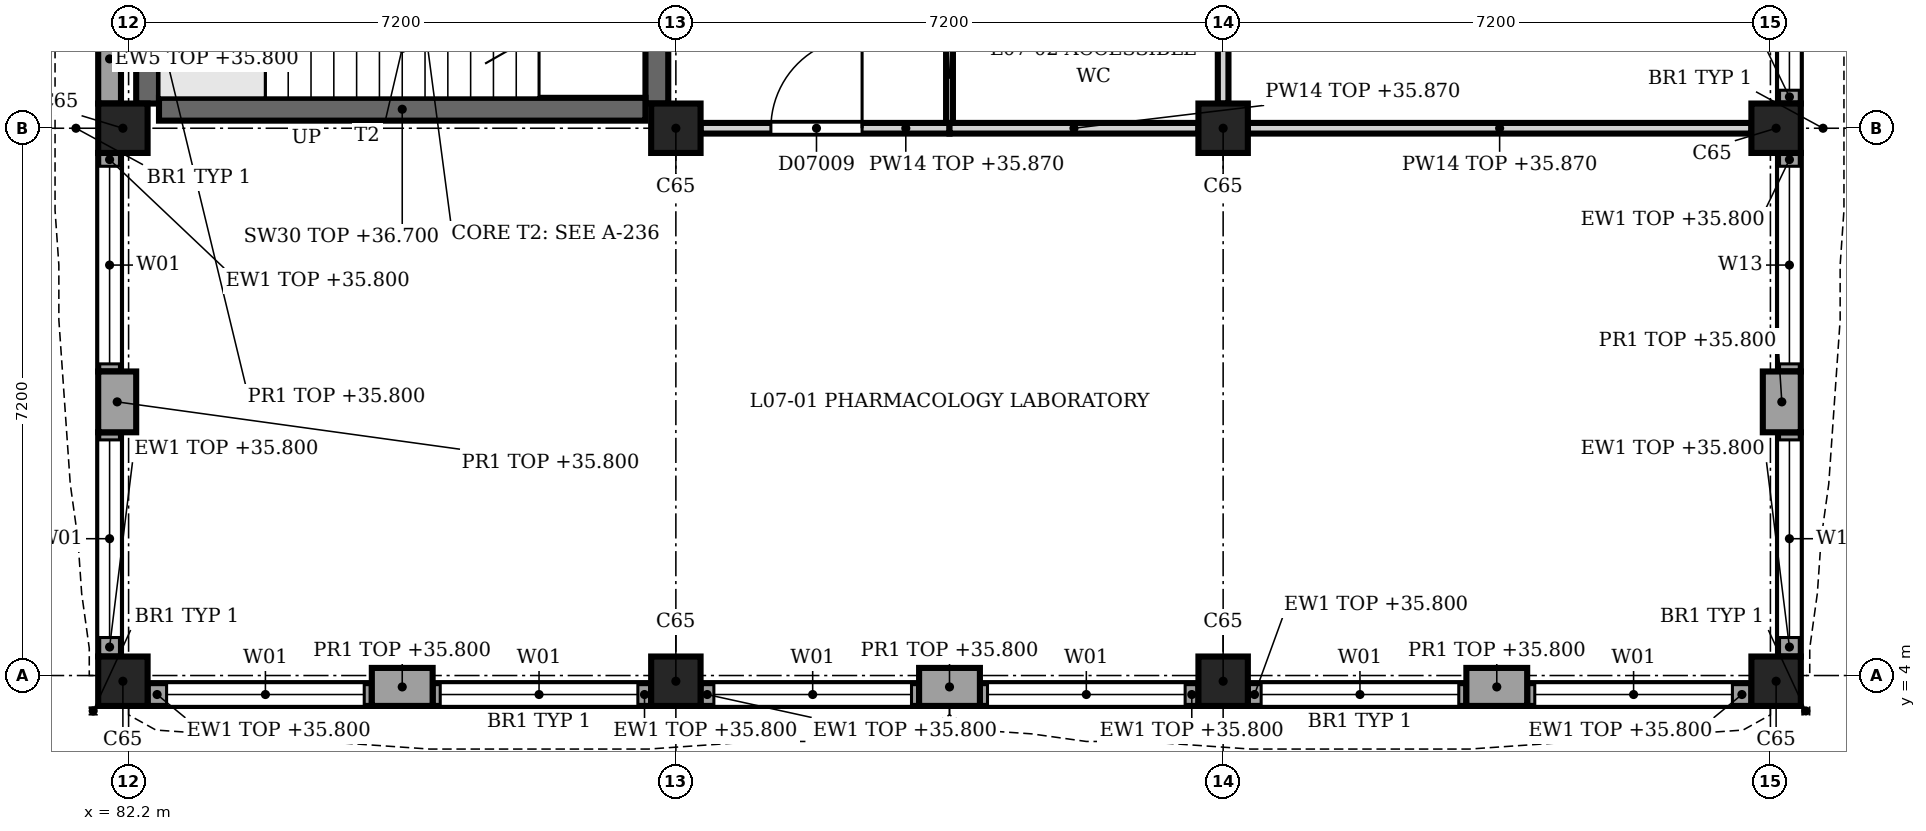
"""IFC4 building model, lengths in metres.
Left out: names, types, materials, properties, quantities, classifications, styles, units other than length and angle.
Written with IfcOpenShell. Run it as: python <this file> out.ifc"""

import sys

from ifc_helpers import new_model, si_unit, direction, frame, frame_2d, origin, origin_2d, place, context, subcontext, project, spatial, rectangle, extrude, element, fill, save


model = new_model("IFC4")
c1 = context("Model", 3, precision=1e-05, world=origin(), true_north=direction((0.0, 1.0)))
c2 = subcontext(c1, "Body", "Model", "MODEL_VIEW")
j1 = project(units=[si_unit("LENGTHUNIT", "METRE"), si_unit("PLANEANGLEUNIT", "RADIAN")], contexts=[c1])
p1 = place(None, origin())
s1 = spatial("IfcSite", under=j1, at=p1, CompositionType="ELEMENT")
p2 = place(p1, origin())
s2 = spatial("IfcBuilding", under=s1, at=p2, CompositionType="ELEMENT")
p3 = place(p2, frame((0.0, 0.0, 32.4)))
s3 = spatial("IfcBuildingStorey", under=s2, at=p3, CompositionType="ELEMENT", Elevation=32.4)
for number, where, z_axis, x_axis in (
    (1, (82.125, 3.925, 0.0), (0.0, 0.0, 1.0), (1.0, 0.0, 0.0)),
    (2, (82.125, 11.2, 0.0), (0.0, 0.0, 1.0), (1.0, 0.0, 0.0)),
    (3, (89.4, 3.925, 0.0), (0.0, 0.0, 1.0), (1.0, 0.0, 0.0)),
    (4, (89.4, 11.2, 0.0), (0.0, 0.0, 1.0), (1.0, 0.0, 0.0)),
    (5, (96.6, 3.925, 0.0), (0.0, 0.0, 1.0), (1.0, 0.0, 0.0)),
    (6, (96.6, 11.2, 0.0), (0.0, 0.0, 1.0), (1.0, 0.0, 0.0)),
    (7, (103.875, 3.925, 0.0), (0.0, 0.0, 1.0), (1.0, 0.0, 0.0)),
    (8, (103.875, 11.2, 0.0), (0.0, 0.0, 1.0), (1.0, 0.0, 0.0)),
):
    element("IfcColumn", number, at=place(p3, frame(where, z_axis=z_axis, x_axis=x_axis)), inside=s3, PredefinedType="COLUMN", context=c2, shape_type="SweptSolid", body=[
        extrude(rectangle(XDim=0.65, YDim=0.65, at=origin_2d()), origin(), (0.0, 0.0, 1.0), 4.5),
    ])
p4 = place(p3, frame((82.05, 7.2, 0.0), z_axis=(0.0, 0.0, 1.0), x_axis=(0.0, 1.0, 0.0)))
e9 = element("IfcWall", 9, at=p4, inside=s3, PredefinedType="SOLIDWALL", context=c2, shape_type="SweptSolid", body=[
    extrude(rectangle(XDim=0.8, YDim=0.5, at=frame_2d((0.4, 0.0))), origin(), (0.0, 0.0, 1.0), 3.4),
])
p5 = place(p3, frame((81.95, 4.25, 0.0), z_axis=(0.0, 0.0, 1.0), x_axis=(0.0, 1.0, 0.0)))
e10 = element("IfcWall", 10, at=p5, inside=s3, PredefinedType="SOLIDWALL", context=c2, shape_type="SweptSolid", body=[
    extrude(rectangle(XDim=2.95, YDim=0.3, at=frame_2d((1.475, 0.0))), origin(), (0.0, 0.0, 1.0), 3.4),
])
p6 = place(p5, frame((0.25, 0.0, 0.9)))
e11 = element("IfcOpeningElement", 11, at=p6, cuts=e10, PredefinedType="OPENING", context=c2, shape_type="SweptSolid", body=[
    extrude(rectangle(XDim=2.6, YDim=2.4, at=frame_2d((1.3, 1.2))), frame((0.0, 0.16, 0.0), z_axis=(0.0, -1.0, 0.0), x_axis=(1.0, 0.0, 0.0)), (0.0, 0.0, 1.0), 0.32),
])
p7 = place(p3, frame((81.95, 8.0, 0.0), z_axis=(0.0, 0.0, 1.0), x_axis=(0.0, 1.0, 0.0)))
e12 = element("IfcWall", 12, at=p7, inside=s3, PredefinedType="SOLIDWALL", context=c2, shape_type="SweptSolid", body=[
    extrude(rectangle(XDim=2.875, YDim=0.3, at=frame_2d((1.438, 0.0))), origin(), (0.0, 0.0, 1.0), 3.4),
])
p8 = place(p7, frame((0.1, 0.0, 0.9)))
e13 = element("IfcOpeningElement", 13, at=p8, cuts=e12, PredefinedType="OPENING", context=c2, shape_type="SweptSolid", body=[
    extrude(rectangle(XDim=2.6, YDim=2.4, at=frame_2d((1.3, 1.2))), frame((0.0, 0.16, 0.0), z_axis=(0.0, -1.0, 0.0), x_axis=(1.0, 0.0, 0.0)), (0.0, 0.0, 1.0), 0.32),
])
p9 = place(p3, frame((81.95, 11.525, 0.0), z_axis=(0.0, 0.0, 1.0), x_axis=(0.0, 1.0, 0.0)))
e14 = element("IfcWall", 14, at=p9, inside=s3, PredefinedType="SOLIDWALL", context=c2, shape_type="SweptSolid", body=[
    extrude(rectangle(XDim=2.875, YDim=0.3, at=frame_2d((1.438, 0.0))), origin(), (0.0, 0.0, 1.0), 3.4),
])
p10 = place(p9, frame((1.175, 0.0, 1.2)))
e15 = element("IfcOpeningElement", 15, at=p10, cuts=e14, PredefinedType="OPENING", context=c2, shape_type="SweptSolid", body=[
    extrude(rectangle(XDim=0.6, YDim=1.8, at=frame_2d((0.3, 0.9))), frame((0.0, 0.16, 0.0), z_axis=(0.0, -1.0, 0.0), x_axis=(1.0, 0.0, 0.0)), (0.0, 0.0, 1.0), 0.32),
])
p11 = place(p3, frame((103.95, 8.0, 0.0), z_axis=(0.0, 0.0, 1.0), x_axis=(0.0, -1.0, 0.0)))
e16 = element("IfcWall", 16, at=p11, inside=s3, PredefinedType="SOLIDWALL", context=c2, shape_type="SweptSolid", body=[
    extrude(rectangle(XDim=0.8, YDim=0.5, at=frame_2d((0.4, 0.0))), origin(), (0.0, 0.0, 1.0), 3.4),
])
p12 = place(p3, frame((104.05, 14.4, 0.0), z_axis=(0.0, 0.0, 1.0), x_axis=(0.0, -1.0, 0.0)))
e17 = element("IfcWall", 17, at=p12, inside=s3, PredefinedType="SOLIDWALL", context=c2, shape_type="SweptSolid", body=[
    extrude(rectangle(XDim=2.875, YDim=0.3, at=frame_2d((1.438, 0.0))), origin(), (0.0, 0.0, 1.0), 3.4),
])
p13 = place(p12, frame((0.1, 0.0, 0.9)))
e18 = element("IfcOpeningElement", 18, at=p13, cuts=e17, PredefinedType="OPENING", context=c2, shape_type="SweptSolid", body=[
    extrude(rectangle(XDim=2.6, YDim=2.2, at=frame_2d((1.3, 1.1))), frame((0.0, 0.16, 0.0), z_axis=(0.0, -1.0, 0.0), x_axis=(1.0, 0.0, 0.0)), (0.0, 0.0, 1.0), 0.32),
])
p14 = place(p3, frame((104.05, 10.875, 0.0), z_axis=(0.0, 0.0, 1.0), x_axis=(0.0, -1.0, 0.0)))
e19 = element("IfcWall", 19, at=p14, inside=s3, PredefinedType="SOLIDWALL", context=c2, shape_type="SweptSolid", body=[
    extrude(rectangle(XDim=2.875, YDim=0.3, at=frame_2d((1.438, 0.0))), origin(), (0.0, 0.0, 1.0), 3.4),
])
p15 = place(p14, frame((0.175, 0.0, 0.9)))
e20 = element("IfcOpeningElement", 20, at=p15, cuts=e19, PredefinedType="OPENING", context=c2, shape_type="SweptSolid", body=[
    extrude(rectangle(XDim=2.6, YDim=2.2, at=frame_2d((1.3, 1.1))), frame((0.0, 0.16, 0.0), z_axis=(0.0, -1.0, 0.0), x_axis=(1.0, 0.0, 0.0)), (0.0, 0.0, 1.0), 0.32),
])
p16 = place(p3, frame((104.05, 7.2, 0.0), z_axis=(0.0, 0.0, 1.0), x_axis=(0.0, -1.0, 0.0)))
e21 = element("IfcWall", 21, at=p16, inside=s3, PredefinedType="SOLIDWALL", context=c2, shape_type="SweptSolid", body=[
    extrude(rectangle(XDim=2.95, YDim=0.3, at=frame_2d((1.475, 0.0))), origin(), (0.0, 0.0, 1.0), 3.4),
])
p17 = place(p16, frame((0.1, 0.0, 0.9)))
e22 = element("IfcOpeningElement", 22, at=p17, cuts=e21, PredefinedType="OPENING", context=c2, shape_type="SweptSolid", body=[
    extrude(rectangle(XDim=2.6, YDim=2.2, at=frame_2d((1.3, 1.1))), frame((0.0, 0.16, 0.0), z_axis=(0.0, -1.0, 0.0), x_axis=(1.0, 0.0, 0.0)), (0.0, 0.0, 1.0), 0.32),
])
p18 = place(p3, frame((100.6, 3.85, 0.0), z_axis=(0.0, 0.0, 1.0), x_axis=(-1.0, 0.0, 0.0)))
e23 = element("IfcWall", 23, at=p18, inside=s3, PredefinedType="SOLIDWALL", context=c2, shape_type="SweptSolid", body=[
    extrude(rectangle(XDim=0.8, YDim=0.5, at=frame_2d((0.4, 0.0))), origin(), (0.0, 0.0, 1.0), 3.4),
])
p19 = place(p3, frame((93.4, 3.85, 0.0), z_axis=(0.0, 0.0, 1.0), x_axis=(-1.0, 0.0, 0.0)))
e24 = element("IfcWall", 24, at=p19, inside=s3, PredefinedType="SOLIDWALL", context=c2, shape_type="SweptSolid", body=[
    extrude(rectangle(XDim=0.8, YDim=0.5, at=frame_2d((0.4, 0.0))), origin(), (0.0, 0.0, 1.0), 3.4),
])
p20 = place(p3, frame((86.2, 3.85, 0.0), z_axis=(0.0, 0.0, 1.0), x_axis=(-1.0, 0.0, 0.0)))
e25 = element("IfcWall", 25, at=p20, inside=s3, PredefinedType="SOLIDWALL", context=c2, shape_type="SweptSolid", body=[
    extrude(rectangle(XDim=0.8, YDim=0.5, at=frame_2d((0.4, 0.0))), origin(), (0.0, 0.0, 1.0), 3.4),
])
p21 = place(p3, frame((103.55, 3.75, 0.0), z_axis=(0.0, 0.0, 1.0), x_axis=(-1.0, 0.0, 0.0)))
e26 = element("IfcWall", 26, at=p21, inside=s3, PredefinedType="SOLIDWALL", context=c2, shape_type="SweptSolid", body=[
    extrude(rectangle(XDim=2.95, YDim=0.3, at=frame_2d((1.475, 0.0))), origin(), (0.0, 0.0, 1.0), 3.4),
])
p22 = place(p21, frame((0.25, 0.0, 0.9)))
e27 = element("IfcOpeningElement", 27, at=p22, cuts=e26, PredefinedType="OPENING", context=c2, shape_type="SweptSolid", body=[
    extrude(rectangle(XDim=2.6, YDim=2.4, at=frame_2d((1.3, 1.2))), frame((0.0, 0.16, 0.0), z_axis=(0.0, -1.0, 0.0), x_axis=(1.0, 0.0, 0.0)), (0.0, 0.0, 1.0), 0.32),
])
p23 = place(p3, frame((99.8, 3.75, 0.0), z_axis=(0.0, 0.0, 1.0), x_axis=(-1.0, 0.0, 0.0)))
e28 = element("IfcWall", 28, at=p23, inside=s3, PredefinedType="SOLIDWALL", context=c2, shape_type="SweptSolid", body=[
    extrude(rectangle(XDim=2.875, YDim=0.3, at=frame_2d((1.438, 0.0))), origin(), (0.0, 0.0, 1.0), 3.4),
])
p24 = place(p23, frame((0.1, 0.0, 0.9)))
e29 = element("IfcOpeningElement", 29, at=p24, cuts=e28, PredefinedType="OPENING", context=c2, shape_type="SweptSolid", body=[
    extrude(rectangle(XDim=2.6, YDim=2.4, at=frame_2d((1.3, 1.2))), frame((0.0, 0.16, 0.0), z_axis=(0.0, -1.0, 0.0), x_axis=(1.0, 0.0, 0.0)), (0.0, 0.0, 1.0), 0.32),
])
p25 = place(p3, frame((96.275, 3.75, 0.0), z_axis=(0.0, 0.0, 1.0), x_axis=(-1.0, 0.0, 0.0)))
e30 = element("IfcWall", 30, at=p25, inside=s3, PredefinedType="SOLIDWALL", context=c2, shape_type="SweptSolid", body=[
    extrude(rectangle(XDim=2.875, YDim=0.3, at=frame_2d((1.438, 0.0))), origin(), (0.0, 0.0, 1.0), 3.4),
])
p26 = place(p25, frame((0.175, 0.0, 0.9)))
e31 = element("IfcOpeningElement", 31, at=p26, cuts=e30, PredefinedType="OPENING", context=c2, shape_type="SweptSolid", body=[
    extrude(rectangle(XDim=2.6, YDim=2.4, at=frame_2d((1.3, 1.2))), frame((0.0, 0.16, 0.0), z_axis=(0.0, -1.0, 0.0), x_axis=(1.0, 0.0, 0.0)), (0.0, 0.0, 1.0), 0.32),
])
p27 = place(p3, frame((92.6, 3.75, 0.0), z_axis=(0.0, 0.0, 1.0), x_axis=(-1.0, 0.0, 0.0)))
e32 = element("IfcWall", 32, at=p27, inside=s3, PredefinedType="SOLIDWALL", context=c2, shape_type="SweptSolid", body=[
    extrude(rectangle(XDim=2.875, YDim=0.3, at=frame_2d((1.438, 0.0))), origin(), (0.0, 0.0, 1.0), 3.4),
])
p28 = place(p27, frame((0.1, 0.0, 0.9)))
e33 = element("IfcOpeningElement", 33, at=p28, cuts=e32, PredefinedType="OPENING", context=c2, shape_type="SweptSolid", body=[
    extrude(rectangle(XDim=2.6, YDim=2.4, at=frame_2d((1.3, 1.2))), frame((0.0, 0.16, 0.0), z_axis=(0.0, -1.0, 0.0), x_axis=(1.0, 0.0, 0.0)), (0.0, 0.0, 1.0), 0.32),
])
p29 = place(p3, frame((89.075, 3.75, 0.0), z_axis=(0.0, 0.0, 1.0), x_axis=(-1.0, 0.0, 0.0)))
e34 = element("IfcWall", 34, at=p29, inside=s3, PredefinedType="SOLIDWALL", context=c2, shape_type="SweptSolid", body=[
    extrude(rectangle(XDim=2.875, YDim=0.3, at=frame_2d((1.438, 0.0))), origin(), (0.0, 0.0, 1.0), 3.4),
])
p30 = place(p29, frame((0.175, 0.0, 0.9)))
e35 = element("IfcOpeningElement", 35, at=p30, cuts=e34, PredefinedType="OPENING", context=c2, shape_type="SweptSolid", body=[
    extrude(rectangle(XDim=2.6, YDim=2.4, at=frame_2d((1.3, 1.2))), frame((0.0, 0.16, 0.0), z_axis=(0.0, -1.0, 0.0), x_axis=(1.0, 0.0, 0.0)), (0.0, 0.0, 1.0), 0.32),
])
p31 = place(p3, frame((85.4, 3.75, 0.0), z_axis=(0.0, 0.0, 1.0), x_axis=(-1.0, 0.0, 0.0)))
e36 = element("IfcWall", 36, at=p31, inside=s3, PredefinedType="SOLIDWALL", context=c2, shape_type="SweptSolid", body=[
    extrude(rectangle(XDim=2.95, YDim=0.3, at=frame_2d((1.475, 0.0))), origin(), (0.0, 0.0, 1.0), 3.4),
])
p32 = place(p31, frame((0.1, 0.0, 0.9)))
e37 = element("IfcOpeningElement", 37, at=p32, cuts=e36, PredefinedType="OPENING", context=c2, shape_type="SweptSolid", body=[
    extrude(rectangle(XDim=2.6, YDim=2.4, at=frame_2d((1.3, 1.2))), frame((0.0, 0.16, 0.0), z_axis=(0.0, -1.0, 0.0), x_axis=(1.0, 0.0, 0.0)), (0.0, 0.0, 1.0), 0.32),
])
p33 = place(p3, frame((89.15, 11.525, 0.0), z_axis=(0.0, 0.0, 1.0), x_axis=(0.0, 1.0, 0.0)))
e38 = element("IfcWall", 38, at=p33, inside=s3, PredefinedType="SHEAR", context=c2, shape_type="SweptSolid", body=[
    extrude(rectangle(XDim=6.55, YDim=0.3, at=frame_2d((3.275, 0.0))), origin(), (0.0, 0.0, 1.0), 4.3),
])
p34 = place(p33, frame((4.275, 0.0, 0.0)))
e39 = element("IfcOpeningElement", 39, at=p34, cuts=e38, PredefinedType="OPENING", context=c2, shape_type="SweptSolid", body=[
    extrude(rectangle(XDim=1.2, YDim=2.1, at=frame_2d((0.6, 1.05))), frame((0.0, 0.16, 0.0), z_axis=(0.0, -1.0, 0.0), x_axis=(1.0, 0.0, 0.0)), (0.0, 0.0, 1.0), 0.32),
])
p35 = place(p3, frame((82.45, 11.525, 0.0), z_axis=(0.0, 0.0, 1.0), x_axis=(0.0, 1.0, 0.0)))
e40 = element("IfcWall", 40, at=p35, inside=s3, PredefinedType="SHEAR", context=c2, shape_type="SweptSolid", body=[
    extrude(rectangle(XDim=6.55, YDim=0.3, at=frame_2d((3.275, 0.0))), origin(), (0.0, 0.0, 1.0), 4.3),
])
p36 = place(p35, frame((1.175, 0.0, 1.2)))
e41 = element("IfcOpeningElement", 41, at=p36, cuts=e40, PredefinedType="OPENING", context=c2, shape_type="SweptSolid", body=[
    extrude(rectangle(XDim=0.6, YDim=1.8, at=frame_2d((0.3, 0.9))), frame((0.0, 0.16, 0.0), z_axis=(0.0, -1.0, 0.0), x_axis=(1.0, 0.0, 0.0)), (0.0, 0.0, 1.0), 0.32),
])
p37 = place(p3, frame((82.6, 11.45, 0.0), z_axis=(0.0, 0.0, 1.0), x_axis=(1.0, 0.0, 0.0)))
e42 = element("IfcWall", 42, at=p37, inside=s3, PredefinedType="SHEAR", context=c2, shape_type="SweptSolid", body=[
    extrude(rectangle(XDim=6.4, YDim=0.3, at=frame_2d((3.2, 0.0))), origin(), (0.0, 0.0, 1.0), 4.3),
])
p38 = place(p3, frame((93.0, 11.2, 0.0), z_axis=(0.0, 0.0, 1.0), x_axis=(-1.0, 0.0, 0.0)))
e43 = element("IfcWall", 43, at=p38, inside=s3, PredefinedType="PARTITIONING", context=c2, shape_type="SweptSolid", body=[
    extrude(rectangle(XDim=3.275, YDim=0.14, at=frame_2d((1.637, 0.0))), origin(), (0.0, 0.0, 1.0), 3.47),
])
p39 = place(p38, frame((1.15, 0.0, 0.0)))
e44 = element("IfcOpeningElement", 44, at=p39, cuts=e43, PredefinedType="OPENING", context=c2, shape_type="SweptSolid", body=[
    extrude(rectangle(XDim=1.2, YDim=2.1, at=frame_2d((0.6, 1.05))), frame((0.0, 0.08, 0.0), z_axis=(0.0, -1.0, 0.0), x_axis=(1.0, 0.0, 0.0)), (0.0, 0.0, 1.0), 0.16),
])
p40 = place(p3, frame((93.0, 11.2, 0.0), z_axis=(0.0, 0.0, 1.0), x_axis=(1.0, 0.0, 0.0)))
e45 = element("IfcWall", 45, at=p40, inside=s3, PredefinedType="PARTITIONING", context=c2, shape_type="SweptSolid", body=[
    extrude(rectangle(XDim=3.275, YDim=0.14, at=frame_2d((1.637, 0.0))), origin(), (0.0, 0.0, 1.0), 3.47),
])
p41 = place(p3, frame((96.925, 11.2, 0.0), z_axis=(0.0, 0.0, 1.0), x_axis=(1.0, 0.0, 0.0)))
e46 = element("IfcWall", 46, at=p41, inside=s3, PredefinedType="PARTITIONING", context=c2, shape_type="SweptSolid", body=[
    extrude(rectangle(XDim=6.625, YDim=0.14, at=frame_2d((3.312, 0.0))), origin(), (0.0, 0.0, 1.0), 3.47),
])
p42 = place(p3, frame((93.0, 14.73, 0.0), z_axis=(0.0, 0.0, 1.0), x_axis=(0.0, -1.0, 0.0)))
e47 = element("IfcWall", 47, at=p42, inside=s3, PredefinedType="PARTITIONING", context=c2, shape_type="SweptSolid", body=[
    extrude(rectangle(XDim=3.46, YDim=0.09, at=frame_2d((1.73, 0.0))), origin(), (0.0, 0.0, 1.0), 3.87),
])
p43 = place(p42, frame((1.18, 0.0, 0.0)))
e48 = element("IfcOpeningElement", 48, at=p43, cuts=e47, PredefinedType="OPENING", context=c2, shape_type="SweptSolid", body=[
    extrude(rectangle(XDim=1.0, YDim=2.2, at=frame_2d((0.5, 1.1))), frame((0.0, 0.055, 0.0), z_axis=(0.0, -1.0, 0.0), x_axis=(1.0, 0.0, 0.0)), (0.0, 0.0, 1.0), 0.11),
])
p44 = place(p3, frame((96.6, 11.525, 0.0), z_axis=(0.0, 0.0, 1.0), x_axis=(0.0, 1.0, 0.0)))
e49 = element("IfcWall", 49, at=p44, inside=s3, PredefinedType="PARTITIONING", context=c2, shape_type="SweptSolid", body=[
    extrude(rectangle(XDim=3.205, YDim=0.14, at=frame_2d((1.603, 0.0))), origin(), (0.0, 0.0, 1.0), 3.47),
])
p45 = place(p6, origin())
e50 = element("IfcWindow", 50, at=p45, inside=s3, PartitioningType="SINGLE_PANEL", PredefinedType="WINDOW", context=c2, shape_type="SweptSolid", body=[
    extrude(rectangle(XDim=2.6, YDim=2.4, at=frame_2d((1.3, 1.2))), frame((0.0, 0.03, 0.0), z_axis=(0.0, -1.0, 0.0), x_axis=(1.0, 0.0, 0.0)), (0.0, 0.0, 1.0), 0.06),
])
fill(e11, e50)
p46 = place(p8, origin())
e51 = element("IfcWindow", 51, at=p46, inside=s3, PartitioningType="SINGLE_PANEL", PredefinedType="WINDOW", context=c2, shape_type="SweptSolid", body=[
    extrude(rectangle(XDim=2.6, YDim=2.4, at=frame_2d((1.3, 1.2))), frame((0.0, 0.03, 0.0), z_axis=(0.0, -1.0, 0.0), x_axis=(1.0, 0.0, 0.0)), (0.0, 0.0, 1.0), 0.06),
])
fill(e13, e51)
p47 = place(p13, origin())
e52 = element("IfcWindow", 52, at=p47, inside=s3, PartitioningType="SINGLE_PANEL", PredefinedType="WINDOW", context=c2, shape_type="SweptSolid", body=[
    extrude(rectangle(XDim=2.6, YDim=2.2, at=frame_2d((1.3, 1.1))), frame((0.0, 0.03, 0.0), z_axis=(0.0, -1.0, 0.0), x_axis=(1.0, 0.0, 0.0)), (0.0, 0.0, 1.0), 0.06),
])
fill(e18, e52)
p48 = place(p15, origin())
e53 = element("IfcWindow", 53, at=p48, inside=s3, PartitioningType="SINGLE_PANEL", PredefinedType="WINDOW", context=c2, shape_type="SweptSolid", body=[
    extrude(rectangle(XDim=2.6, YDim=2.2, at=frame_2d((1.3, 1.1))), frame((0.0, 0.03, 0.0), z_axis=(0.0, -1.0, 0.0), x_axis=(1.0, 0.0, 0.0)), (0.0, 0.0, 1.0), 0.06),
])
fill(e20, e53)
p49 = place(p17, origin())
e54 = element("IfcWindow", 54, at=p49, inside=s3, PartitioningType="SINGLE_PANEL", PredefinedType="WINDOW", context=c2, shape_type="SweptSolid", body=[
    extrude(rectangle(XDim=2.6, YDim=2.2, at=frame_2d((1.3, 1.1))), frame((0.0, 0.03, 0.0), z_axis=(0.0, -1.0, 0.0), x_axis=(1.0, 0.0, 0.0)), (0.0, 0.0, 1.0), 0.06),
])
fill(e22, e54)
p50 = place(p22, origin())
e55 = element("IfcWindow", 55, at=p50, inside=s3, PartitioningType="SINGLE_PANEL", PredefinedType="WINDOW", context=c2, shape_type="SweptSolid", body=[
    extrude(rectangle(XDim=2.6, YDim=2.4, at=frame_2d((1.3, 1.2))), frame((0.0, 0.03, 0.0), z_axis=(0.0, -1.0, 0.0), x_axis=(1.0, 0.0, 0.0)), (0.0, 0.0, 1.0), 0.06),
])
fill(e27, e55)
p51 = place(p24, origin())
e56 = element("IfcWindow", 56, at=p51, inside=s3, PartitioningType="SINGLE_PANEL", PredefinedType="WINDOW", context=c2, shape_type="SweptSolid", body=[
    extrude(rectangle(XDim=2.6, YDim=2.4, at=frame_2d((1.3, 1.2))), frame((0.0, 0.03, 0.0), z_axis=(0.0, -1.0, 0.0), x_axis=(1.0, 0.0, 0.0)), (0.0, 0.0, 1.0), 0.06),
])
fill(e29, e56)
p52 = place(p26, origin())
e57 = element("IfcWindow", 57, at=p52, inside=s3, PartitioningType="SINGLE_PANEL", PredefinedType="WINDOW", context=c2, shape_type="SweptSolid", body=[
    extrude(rectangle(XDim=2.6, YDim=2.4, at=frame_2d((1.3, 1.2))), frame((0.0, 0.03, 0.0), z_axis=(0.0, -1.0, 0.0), x_axis=(1.0, 0.0, 0.0)), (0.0, 0.0, 1.0), 0.06),
])
fill(e31, e57)
p53 = place(p28, origin())
e58 = element("IfcWindow", 58, at=p53, inside=s3, PartitioningType="SINGLE_PANEL", PredefinedType="WINDOW", context=c2, shape_type="SweptSolid", body=[
    extrude(rectangle(XDim=2.6, YDim=2.4, at=frame_2d((1.3, 1.2))), frame((0.0, 0.03, 0.0), z_axis=(0.0, -1.0, 0.0), x_axis=(1.0, 0.0, 0.0)), (0.0, 0.0, 1.0), 0.06),
])
fill(e33, e58)
p54 = place(p30, origin())
e59 = element("IfcWindow", 59, at=p54, inside=s3, PartitioningType="SINGLE_PANEL", PredefinedType="WINDOW", context=c2, shape_type="SweptSolid", body=[
    extrude(rectangle(XDim=2.6, YDim=2.4, at=frame_2d((1.3, 1.2))), frame((0.0, 0.03, 0.0), z_axis=(0.0, -1.0, 0.0), x_axis=(1.0, 0.0, 0.0)), (0.0, 0.0, 1.0), 0.06),
])
fill(e35, e59)
p55 = place(p32, origin())
e60 = element("IfcWindow", 60, at=p55, inside=s3, PartitioningType="SINGLE_PANEL", PredefinedType="WINDOW", context=c2, shape_type="SweptSolid", body=[
    extrude(rectangle(XDim=2.6, YDim=2.4, at=frame_2d((1.3, 1.2))), frame((0.0, 0.03, 0.0), z_axis=(0.0, -1.0, 0.0), x_axis=(1.0, 0.0, 0.0)), (0.0, 0.0, 1.0), 0.06),
])
fill(e37, e60)
p56 = place(p39, origin())
e61 = element("IfcDoor", 61, at=p56, inside=s3, OperationType="SINGLE_SWING_RIGHT", PredefinedType="DOOR", context=c2, shape_type="SweptSolid", body=[
    extrude(rectangle(XDim=1.2, YDim=2.1, at=frame_2d((0.6, 1.05))), frame((0.0, 0.025, 0.0), z_axis=(0.0, -1.0, 0.0), x_axis=(1.0, 0.0, 0.0)), (0.0, 0.0, 1.0), 0.05),
])
fill(e44, e61)
save(model, sys.argv[1])
